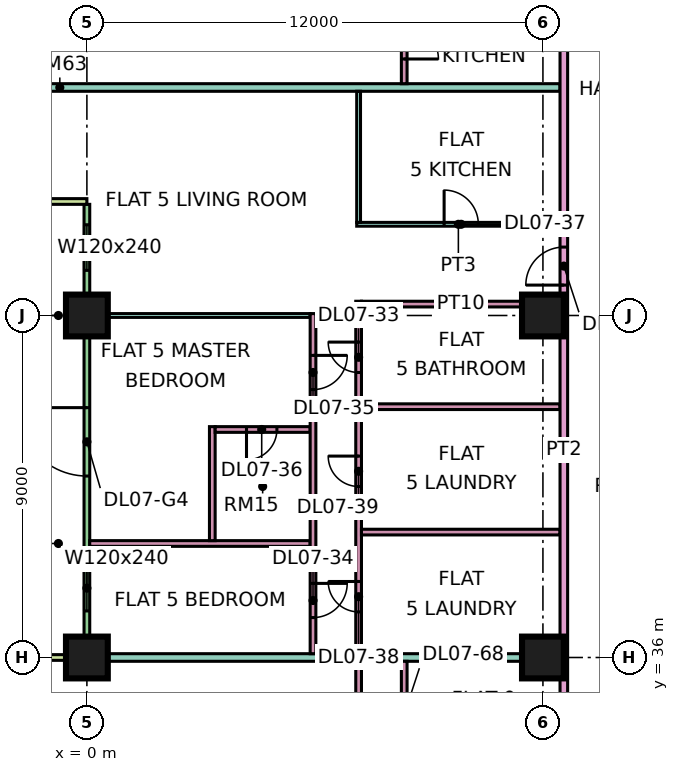
"""IFC4 building model, lengths in metres.
Left out: names, types, materials, properties, quantities, classifications, styles, units other than length and angle.
Written with IfcOpenShell. Run it as: python <this file> out.ifc"""

import sys

from ifc_helpers import new_model, si_unit, direction, frame, frame_2d, origin, origin_2d, place, context, subcontext, project, spatial, rectangle, extrude, element, fill, save


model = new_model("IFC4")
c1 = context("Model", 3, precision=1e-05, world=origin(), true_north=direction((0.0, 1.0)))
c2 = subcontext(c1, "Body", "Model", "MODEL_VIEW")
j1 = project(units=[si_unit("LENGTHUNIT", "METRE"), si_unit("PLANEANGLEUNIT", "RADIAN")], contexts=[c1])
p1 = place(None, origin())
s1 = spatial("IfcSite", under=j1, at=p1, CompositionType="ELEMENT")
p2 = place(p1, origin())
s2 = spatial("IfcBuilding", under=s1, at=p2, CompositionType="ELEMENT")
p3 = place(p2, frame((0.0, 0.0, 41.4)))
s3 = spatial("IfcBuildingStorey", under=s2, at=p3, CompositionType="ELEMENT", Elevation=41.4)
p4 = place(p3, frame((0.0, 36.0, 0.0), z_axis=(0.0, 0.0, 1.0), x_axis=(1.0, 0.0, 0.0)))
e1 = element("IfcColumn", 1, at=p4, inside=s3, PredefinedType="COLUMN", context=c2, shape_type="SweptSolid", body=[
    extrude(rectangle(XDim=1.1, YDim=1.1, at=origin_2d()), origin(), (0.0, 0.0, 1.0), 3.75),
])
for number, where, z_axis, x_axis in (
    (2, (0.0, 45.0, 0.0), (0.0, 0.0, 1.0), (1.0, 0.0, 0.0)),
    (3, (12.0, 36.0, 0.0), (0.0, 0.0, 1.0), (1.0, 0.0, 0.0)),
    (4, (12.0, 45.0, 0.0), (0.0, 0.0, 1.0), (1.0, 0.0, 0.0)),
):
    element("IfcColumn", number, at=place(p3, frame(where, z_axis=z_axis, x_axis=x_axis)), inside=s3, PredefinedType="COLUMN", context=c2, shape_type="SweptSolid", body=[
        extrude(rectangle(XDim=1.1, YDim=1.1, at=origin_2d()), origin(), (0.0, 0.0, 1.0), 3.75),
    ])
p5 = place(p3, frame((0.0, 47.925, 0.0), z_axis=(0.0, 0.0, 1.0), x_axis=(0.0, -1.0, 0.0)))
e5 = element("IfcWall", 5, at=p5, inside=s3, PredefinedType="SOLIDWALL", context=c2, shape_type="SweptSolid", body=[
    extrude(rectangle(XDim=11.85, YDim=0.15, at=frame_2d((5.925, 0.0))), origin(), (0.0, 0.0, 1.0), 3.35),
])
p6 = place(p5, frame((0.538, 0.0, 0.45)))
e6 = element("IfcOpeningElement", 6, at=p6, cuts=e5, PredefinedType="OPENING", context=c2, shape_type="SweptSolid", body=[
    extrude(rectangle(XDim=1.2, YDim=2.4, at=frame_2d((0.6, 1.2))), frame((0.0, 0.085, 0.0), z_axis=(0.0, -1.0, 0.0), x_axis=(1.0, 0.0, 0.0)), (0.0, 0.0, 1.0), 0.17),
])
p7 = place(p5, frame((5.35, 0.0, 0.0)))
e7 = element("IfcOpeningElement", 7, at=p7, cuts=e5, PredefinedType="OPENING", context=c2, shape_type="SweptSolid", body=[
    extrude(rectangle(XDim=1.8, YDim=2.4, at=frame_2d((0.9, 1.2))), frame((0.0, 0.085, 0.0), z_axis=(0.0, -1.0, 0.0), x_axis=(1.0, 0.0, 0.0)), (0.0, 0.0, 1.0), 0.17),
])
p8 = place(p5, frame((9.5, 0.0, 0.45)))
e8 = element("IfcOpeningElement", 8, at=p8, cuts=e5, PredefinedType="OPENING", context=c2, shape_type="SweptSolid", body=[
    extrude(rectangle(XDim=1.2, YDim=2.4, at=frame_2d((0.6, 1.2))), frame((0.0, 0.085, 0.0), z_axis=(0.0, -1.0, 0.0), x_axis=(1.0, 0.0, 0.0)), (0.0, 0.0, 1.0), 0.17),
])
for number, where, z_axis, x_axis in (
    (9, (-1.5, 48.0, 0.0), (0.0, 0.0, 1.0), (1.0, 0.0, 0.0)),
    (10, (-1.5, 36.0, 0.0), (0.0, 0.0, 1.0), (1.0, 0.0, 0.0)),
):
    element("IfcWall", number, at=place(p3, frame(where, z_axis=z_axis, x_axis=x_axis)), inside=s3, PredefinedType="SOLIDWALL", context=c2, shape_type="SweptSolid", body=[
        extrude(rectangle(XDim=1.5, YDim=0.15, at=frame_2d((0.75, 0.0))), origin(), (0.0, 0.0, 1.0), 3.35),
    ])
e11 = element("IfcWall", 11, at=p4, inside=s3, PredefinedType="PARTITIONING", context=c2, shape_type="SweptSolid", body=[
    extrude(rectangle(XDim=12.45, YDim=0.2, at=frame_2d((6.225, 0.0))), origin(), (0.0, 0.0, 1.0), 3.35),
])
p9 = place(p3, frame((-1.35, 51.0, 0.0), z_axis=(0.0, 0.0, 1.0), x_axis=(1.0, 0.0, 0.0)))
e12 = element("IfcWall", 12, at=p9, inside=s3, PredefinedType="PARTITIONING", context=c2, shape_type="SweptSolid", body=[
    extrude(rectangle(XDim=13.8, YDim=0.2, at=frame_2d((6.9, 0.0))), origin(), (0.0, 0.0, 1.0), 3.35),
])
p10 = place(p3, frame((0.074, 39.0, 0.0), z_axis=(0.0, 0.0, 1.0), x_axis=(1.0, 0.0, 0.0)))
e13 = element("IfcWall", 13, at=p10, inside=s3, PredefinedType="PARTITIONING", context=c2, shape_type="SweptSolid", body=[
    extrude(rectangle(XDim=5.801, YDim=0.15, at=frame_2d((2.9, 0.0))), origin(), (0.0, 0.0, 1.0), 3.35),
])
p11 = place(p3, frame((0.074, 45.0, 0.0), z_axis=(0.0, 0.0, 1.0), x_axis=(1.0, 0.0, 0.0)))
e14 = element("IfcWall", 14, at=p11, inside=s3, PredefinedType="PARTITIONING", context=c2, shape_type="SweptSolid", body=[
    extrude(rectangle(XDim=5.801, YDim=0.1, at=frame_2d((2.9, 0.0))), origin(), (0.0, 0.0, 1.0), 3.35),
])
p12 = place(p3, frame((3.3, 39.075, 0.0), z_axis=(0.0, 0.0, 1.0), x_axis=(0.0, 1.0, 0.0)))
e15 = element("IfcWall", 15, at=p12, inside=s3, PredefinedType="PARTITIONING", context=c2, shape_type="SweptSolid", body=[
    extrude(rectangle(XDim=3.0, YDim=0.15, at=frame_2d((1.5, 0.0))), origin(), (0.0, 0.0, 1.0), 3.35),
])
p13 = place(p3, frame((3.375, 42.0, 0.0), z_axis=(0.0, 0.0, 1.0), x_axis=(1.0, 0.0, 0.0)))
e16 = element("IfcWall", 16, at=p13, inside=s3, PredefinedType="PARTITIONING", context=c2, shape_type="SweptSolid", body=[
    extrude(rectangle(XDim=2.5, YDim=0.15, at=frame_2d((1.25, 0.0))), origin(), (0.0, 0.0, 1.0), 3.35),
])
p14 = place(p13, frame((0.825, 0.0, 0.0)))
e17 = element("IfcOpeningElement", 17, at=p14, cuts=e16, PredefinedType="OPENING", context=c2, shape_type="SweptSolid", body=[
    extrude(rectangle(XDim=0.8, YDim=2.1, at=frame_2d((0.4, 1.05))), frame((0.0, 0.085, 0.0), z_axis=(0.0, -1.0, 0.0), x_axis=(1.0, 0.0, 0.0)), (0.0, 0.0, 1.0), 0.17),
])
p15 = place(p3, frame((5.95, 36.1, 0.0), z_axis=(0.0, 0.0, 1.0), x_axis=(0.0, 1.0, 0.0)))
e18 = element("IfcWall", 18, at=p15, inside=s3, PredefinedType="PARTITIONING", context=c2, shape_type="SweptSolid", body=[
    extrude(rectangle(XDim=8.95, YDim=0.15, at=frame_2d((4.475, 0.0))), origin(), (0.0, 0.0, 1.0), 3.35),
])
p16 = place(p15, frame((0.95, 0.0, 0.0)))
e19 = element("IfcOpeningElement", 19, at=p16, cuts=e18, PredefinedType="OPENING", context=c2, shape_type="SweptSolid", body=[
    extrude(rectangle(XDim=0.9, YDim=2.1, at=frame_2d((0.45, 1.05))), frame((0.0, 0.085, 0.0), z_axis=(0.0, -1.0, 0.0), x_axis=(1.0, 0.0, 0.0)), (0.0, 0.0, 1.0), 0.17),
])
p17 = place(p15, frame((6.95, 0.0, 0.0)))
e20 = element("IfcOpeningElement", 20, at=p17, cuts=e18, PredefinedType="OPENING", context=c2, shape_type="SweptSolid", body=[
    extrude(rectangle(XDim=0.9, YDim=2.1, at=frame_2d((0.45, 1.05))), frame((0.0, 0.085, 0.0), z_axis=(0.0, -1.0, 0.0), x_axis=(1.0, 0.0, 0.0)), (0.0, 0.0, 1.0), 0.17),
])
p18 = place(p3, frame((7.1, 47.4, 0.0), z_axis=(0.0, 0.0, 1.0), x_axis=(1.0, 0.0, 0.0)))
e21 = element("IfcWall", 21, at=p18, inside=s3, PredefinedType="PARTITIONING", context=c2, shape_type="SweptSolid", body=[
    extrude(rectangle(XDim=5.35, YDim=0.1, at=frame_2d((2.675, 0.0))), origin(), (0.0, 0.0, 1.0), 3.35),
])
p19 = place(p18, frame((2.3, 0.0, 0.0)))
e22 = element("IfcOpeningElement", 22, at=p19, cuts=e21, PredefinedType="OPENING", context=c2, shape_type="SweptSolid", body=[
    extrude(rectangle(XDim=0.9, YDim=2.1, at=frame_2d((0.45, 1.05))), frame((0.0, 0.06, 0.0), z_axis=(0.0, -1.0, 0.0), x_axis=(1.0, 0.0, 0.0)), (0.0, 0.0, 1.0), 0.12),
])
p20 = place(p3, frame((7.15, 29.95, 0.0), z_axis=(0.0, 0.0, 1.0), x_axis=(0.0, 1.0, 0.0)))
e23 = element("IfcWall", 23, at=p20, inside=s3, PredefinedType="PARTITIONING", context=c2, shape_type="SweptSolid", body=[
    extrude(rectangle(XDim=5.95, YDim=0.15, at=frame_2d((2.975, 0.0))), origin(), (0.0, 0.0, 1.0), 3.35),
])
p21 = place(p20, frame((1.1, 0.0, 0.0)))
e24 = element("IfcOpeningElement", 24, at=p21, cuts=e23, PredefinedType="OPENING", context=c2, shape_type="SweptSolid", body=[
    extrude(rectangle(XDim=0.9, YDim=2.1, at=frame_2d((0.45, 1.05))), frame((0.0, 0.085, 0.0), z_axis=(0.0, -1.0, 0.0), x_axis=(1.0, 0.0, 0.0)), (0.0, 0.0, 1.0), 0.17),
])
p22 = place(p20, frame((4.1, 0.0, 0.0)))
e25 = element("IfcOpeningElement", 25, at=p22, cuts=e23, PredefinedType="OPENING", context=c2, shape_type="SweptSolid", body=[
    extrude(rectangle(XDim=0.9, YDim=2.1, at=frame_2d((0.45, 1.05))), frame((0.0, 0.085, 0.0), z_axis=(0.0, -1.0, 0.0), x_axis=(1.0, 0.0, 0.0)), (0.0, 0.0, 1.0), 0.17),
])
p23 = place(p3, frame((7.15, 36.1, 0.0), z_axis=(0.0, 0.0, 1.0), x_axis=(0.0, 1.0, 0.0)))
e26 = element("IfcWall", 26, at=p23, inside=s3, PredefinedType="PARTITIONING", context=c2, shape_type="SweptSolid", body=[
    extrude(rectangle(XDim=9.275, YDim=0.15, at=frame_2d((4.637, 0.0))), origin(), (0.0, 0.0, 1.0), 3.35),
])
p24 = place(p23, frame((7.4, 0.0, 0.0)))
e27 = element("IfcOpeningElement", 27, at=p24, cuts=e26, PredefinedType="OPENING", context=c2, shape_type="SweptSolid", body=[
    extrude(rectangle(XDim=0.8, YDim=2.1, at=frame_2d((0.4, 1.05))), frame((0.0, 0.085, 0.0), z_axis=(0.0, -1.0, 0.0), x_axis=(1.0, 0.0, 0.0)), (0.0, 0.0, 1.0), 0.17),
])
p25 = place(p23, frame((1.1, 0.0, 0.0)))
e28 = element("IfcOpeningElement", 28, at=p25, cuts=e26, PredefinedType="OPENING", context=c2, shape_type="SweptSolid", body=[
    extrude(rectangle(XDim=0.8, YDim=2.1, at=frame_2d((0.4, 1.05))), frame((0.0, 0.085, 0.0), z_axis=(0.0, -1.0, 0.0), x_axis=(1.0, 0.0, 0.0)), (0.0, 0.0, 1.0), 0.17),
])
p26 = place(p23, frame((4.4, 0.0, 0.0)))
e29 = element("IfcOpeningElement", 29, at=p26, cuts=e26, PredefinedType="OPENING", context=c2, shape_type="SweptSolid", body=[
    extrude(rectangle(XDim=0.8, YDim=2.1, at=frame_2d((0.4, 1.05))), frame((0.0, 0.085, 0.0), z_axis=(0.0, -1.0, 0.0), x_axis=(1.0, 0.0, 0.0)), (0.0, 0.0, 1.0), 0.17),
])
p27 = place(p3, frame((7.15, 47.45, 0.0), z_axis=(0.0, 0.0, 1.0), x_axis=(0.0, 1.0, 0.0)))
e30 = element("IfcWall", 30, at=p27, inside=s3, PredefinedType="PARTITIONING", context=c2, shape_type="SweptSolid", body=[
    extrude(rectangle(XDim=3.45, YDim=0.1, at=frame_2d((1.725, 0.0))), origin(), (0.0, 0.0, 1.0), 3.35),
])
for number, where, z_axis, x_axis in (
    (31, (7.225, 39.3, 0.0), (0.0, 0.0, 1.0), (1.0, 0.0, 0.0)),
    (32, (7.225, 42.6, 0.0), (0.0, 0.0, 1.0), (1.0, 0.0, 0.0)),
    (33, (7.225, 45.3, 0.0), (0.0, 0.0, 1.0), (1.0, 0.0, 0.0)),
):
    element("IfcWall", number, at=place(p3, frame(where, z_axis=z_axis, x_axis=x_axis)), inside=s3, PredefinedType="PARTITIONING", context=c2, shape_type="SweptSolid", body=[
        extrude(rectangle(XDim=5.225, YDim=0.15, at=frame_2d((2.612, 0.0))), origin(), (0.0, 0.0, 1.0), 3.35),
    ])
p28 = place(p3, frame((8.35, 26.325, 0.0), z_axis=(0.0, 0.0, 1.0), x_axis=(0.0, 1.0, 0.0)))
e34 = element("IfcWall", 34, at=p28, inside=s3, PredefinedType="PARTITIONING", context=c2, shape_type="SweptSolid", body=[
    extrude(rectangle(XDim=9.575, YDim=0.15, at=frame_2d((4.788, 0.0))), origin(), (0.0, 0.0, 1.0), 3.35),
])
p29 = place(p28, frame((4.425, 0.0, 0.0)))
e35 = element("IfcOpeningElement", 35, at=p29, cuts=e34, PredefinedType="OPENING", context=c2, shape_type="SweptSolid", body=[
    extrude(rectangle(XDim=0.8, YDim=2.1, at=frame_2d((0.4, 1.05))), frame((0.0, 0.085, 0.0), z_axis=(0.0, -1.0, 0.0), x_axis=(1.0, 0.0, 0.0)), (0.0, 0.0, 1.0), 0.17),
])
p30 = place(p28, frame((7.725, 0.0, 0.0)))
e36 = element("IfcOpeningElement", 36, at=p30, cuts=e34, PredefinedType="OPENING", context=c2, shape_type="SweptSolid", body=[
    extrude(rectangle(XDim=0.9, YDim=2.1, at=frame_2d((0.45, 1.05))), frame((0.0, 0.085, 0.0), z_axis=(0.0, -1.0, 0.0), x_axis=(1.0, 0.0, 0.0)), (0.0, 0.0, 1.0), 0.17),
])
p31 = place(p28, frame((1.125, 0.0, 0.0)))
e37 = element("IfcOpeningElement", 37, at=p31, cuts=e34, PredefinedType="OPENING", context=c2, shape_type="SweptSolid", body=[
    extrude(rectangle(XDim=0.8, YDim=2.1, at=frame_2d((0.4, 1.05))), frame((0.0, 0.085, 0.0), z_axis=(0.0, -1.0, 0.0), x_axis=(1.0, 0.0, 0.0)), (0.0, 0.0, 1.0), 0.17),
])
p32 = place(p3, frame((8.35, 51.1, 0.0), z_axis=(0.0, 0.0, 1.0), x_axis=(0.0, 1.0, 0.0)))
e38 = element("IfcWall", 38, at=p32, inside=s3, PredefinedType="PARTITIONING", context=c2, shape_type="SweptSolid", body=[
    extrude(rectangle(XDim=5.675, YDim=0.15, at=frame_2d((2.837, 0.0))), origin(), (0.0, 0.0, 1.0), 3.35),
])
p33 = place(p32, frame((0.65, 0.0, 0.0)))
e39 = element("IfcOpeningElement", 39, at=p33, cuts=e38, PredefinedType="OPENING", context=c2, shape_type="SweptSolid", body=[
    extrude(rectangle(XDim=0.9, YDim=2.1, at=frame_2d((0.45, 1.05))), frame((0.0, 0.085, 0.0), z_axis=(0.0, -1.0, 0.0), x_axis=(1.0, 0.0, 0.0)), (0.0, 0.0, 1.0), 0.17),
])
p34 = place(p3, frame((12.55, 20.0, 0.0), z_axis=(0.0, 0.0, 1.0), x_axis=(0.0, 1.0, 0.0)))
e40 = element("IfcWall", 40, at=p34, inside=s3, PredefinedType="PARTITIONING", context=c2, shape_type="SweptSolid", body=[
    extrude(rectangle(XDim=42.926, YDim=0.2, at=frame_2d((21.463, 0.0))), origin(), (0.0, 0.0, 1.0), 3.35),
])
p35 = place(p34, frame((25.8, 0.0, 0.0)))
e41 = element("IfcOpeningElement", 41, at=p35, cuts=e40, PredefinedType="OPENING", context=c2, shape_type="SweptSolid", body=[
    extrude(rectangle(XDim=1.0, YDim=2.1, at=frame_2d((0.5, 1.05))), frame((0.0, 0.11, 0.0), z_axis=(0.0, -1.0, 0.0), x_axis=(1.0, 0.0, 0.0)), (0.0, 0.0, 1.0), 0.22),
])
p36 = place(p34, frame((37.65, 0.0, 0.0)))
e42 = element("IfcOpeningElement", 42, at=p36, cuts=e40, PredefinedType="OPENING", context=c2, shape_type="SweptSolid", body=[
    extrude(rectangle(XDim=1.0, YDim=2.1, at=frame_2d((0.5, 1.05))), frame((0.0, 0.11, 0.0), z_axis=(0.0, -1.0, 0.0), x_axis=(1.0, 0.0, 0.0)), (0.0, 0.0, 1.0), 0.22),
])
p37 = place(p34, frame((0.6, 0.0, 0.0)))
e43 = element("IfcOpeningElement", 43, at=p37, cuts=e40, PredefinedType="OPENING", context=c2, shape_type="SweptSolid", body=[
    extrude(rectangle(XDim=1.2, YDim=2.1, at=frame_2d((0.6, 1.05))), frame((0.0, 0.11, 0.0), z_axis=(0.0, -1.0, 0.0), x_axis=(1.0, 0.0, 0.0)), (0.0, 0.0, 1.0), 0.22),
])
p38 = place(p34, frame((4.65, 0.0, 0.0)))
e44 = element("IfcOpeningElement", 44, at=p38, cuts=e40, PredefinedType="OPENING", context=c2, shape_type="SweptSolid", body=[
    extrude(rectangle(XDim=1.0, YDim=2.1, at=frame_2d((0.5, 1.05))), frame((0.0, 0.11, 0.0), z_axis=(0.0, -1.0, 0.0), x_axis=(1.0, 0.0, 0.0)), (0.0, 0.0, 1.0), 0.22),
])
p39 = place(p6, origin())
e45 = element("IfcWindow", 45, at=p39, inside=s3, PartitioningType="SINGLE_PANEL", PredefinedType="WINDOW", context=c2, shape_type="SweptSolid", body=[
    extrude(rectangle(XDim=1.2, YDim=2.4, at=frame_2d((0.6, 1.2))), frame((0.0, 0.03, 0.0), z_axis=(0.0, -1.0, 0.0), x_axis=(1.0, 0.0, 0.0)), (0.0, 0.0, 1.0), 0.06),
])
fill(e6, e45)
p40 = place(p7, frame((1.8, 0.0, 0.0), z_axis=(0.0, 0.0, 1.0), x_axis=(-1.0, 0.0, 0.0)))
e46 = element("IfcDoor", 46, at=p40, inside=s3, OperationType="DOUBLE_DOOR_SINGLE_SWING", PredefinedType="DOOR", context=c2, shape_type="SweptSolid", body=[
    extrude(rectangle(XDim=1.8, YDim=2.4, at=frame_2d((0.9, 1.2))), frame((0.0, 0.025, 0.0), z_axis=(0.0, -1.0, 0.0), x_axis=(1.0, 0.0, 0.0)), (0.0, 0.0, 1.0), 0.05),
])
fill(e7, e46)
p41 = place(p8, origin())
e47 = element("IfcWindow", 47, at=p41, inside=s3, PartitioningType="SINGLE_PANEL", PredefinedType="WINDOW", context=c2, shape_type="SweptSolid", body=[
    extrude(rectangle(XDim=1.2, YDim=2.4, at=frame_2d((0.6, 1.2))), frame((0.0, 0.03, 0.0), z_axis=(0.0, -1.0, 0.0), x_axis=(1.0, 0.0, 0.0)), (0.0, 0.0, 1.0), 0.06),
])
fill(e8, e47)
p42 = place(p24, frame((0.8, 0.0, 0.0), z_axis=(0.0, 0.0, 1.0), x_axis=(-1.0, 0.0, 0.0)))
e48 = element("IfcDoor", 48, at=p42, inside=s3, OperationType="SINGLE_SWING_RIGHT", PredefinedType="DOOR", context=c2, shape_type="SweptSolid", body=[
    extrude(rectangle(XDim=0.8, YDim=2.1, at=frame_2d((0.4, 1.05))), frame((0.0, 0.025, 0.0), z_axis=(0.0, -1.0, 0.0), x_axis=(1.0, 0.0, 0.0)), (0.0, 0.0, 1.0), 0.05),
])
fill(e27, e48)
p43 = place(p16, origin())
e49 = element("IfcDoor", 49, at=p43, inside=s3, OperationType="SINGLE_SWING_RIGHT", PredefinedType="DOOR", context=c2, shape_type="SweptSolid", body=[
    extrude(rectangle(XDim=0.9, YDim=2.1, at=frame_2d((0.45, 1.05))), frame((0.0, 0.025, 0.0), z_axis=(0.0, -1.0, 0.0), x_axis=(1.0, 0.0, 0.0)), (0.0, 0.0, 1.0), 0.05),
])
fill(e19, e49)
p44 = place(p17, origin())
e50 = element("IfcDoor", 50, at=p44, inside=s3, OperationType="SINGLE_SWING_RIGHT", PredefinedType="DOOR", context=c2, shape_type="SweptSolid", body=[
    extrude(rectangle(XDim=0.9, YDim=2.1, at=frame_2d((0.45, 1.05))), frame((0.0, 0.025, 0.0), z_axis=(0.0, -1.0, 0.0), x_axis=(1.0, 0.0, 0.0)), (0.0, 0.0, 1.0), 0.05),
])
fill(e20, e50)
p45 = place(p14, frame((0.8, 0.0, 0.0), z_axis=(0.0, 0.0, 1.0), x_axis=(-1.0, 0.0, 0.0)))
e51 = element("IfcDoor", 51, at=p45, inside=s3, OperationType="SINGLE_SWING_LEFT", PredefinedType="DOOR", context=c2, shape_type="SweptSolid", body=[
    extrude(rectangle(XDim=0.8, YDim=2.1, at=frame_2d((0.4, 1.05))), frame((0.0, 0.025, 0.0), z_axis=(0.0, -1.0, 0.0), x_axis=(1.0, 0.0, 0.0)), (0.0, 0.0, 1.0), 0.05),
])
fill(e17, e51)
p46 = place(p19, origin())
e52 = element("IfcDoor", 52, at=p46, inside=s3, OperationType="SINGLE_SWING_LEFT", PredefinedType="DOOR", context=c2, shape_type="SweptSolid", body=[
    extrude(rectangle(XDim=0.9, YDim=2.1, at=frame_2d((0.45, 1.05))), frame((0.0, 0.025, 0.0), z_axis=(0.0, -1.0, 0.0), x_axis=(1.0, 0.0, 0.0)), (0.0, 0.0, 1.0), 0.05),
])
fill(e22, e52)
p47 = place(p25, frame((0.8, 0.0, 0.0), z_axis=(0.0, 0.0, 1.0), x_axis=(-1.0, 0.0, 0.0)))
e53 = element("IfcDoor", 53, at=p47, inside=s3, OperationType="SINGLE_SWING_RIGHT", PredefinedType="DOOR", context=c2, shape_type="SweptSolid", body=[
    extrude(rectangle(XDim=0.8, YDim=2.1, at=frame_2d((0.4, 1.05))), frame((0.0, 0.025, 0.0), z_axis=(0.0, -1.0, 0.0), x_axis=(1.0, 0.0, 0.0)), (0.0, 0.0, 1.0), 0.05),
])
fill(e28, e53)
p48 = place(p26, frame((0.8, 0.0, 0.0), z_axis=(0.0, 0.0, 1.0), x_axis=(-1.0, 0.0, 0.0)))
e54 = element("IfcDoor", 54, at=p48, inside=s3, OperationType="SINGLE_SWING_RIGHT", PredefinedType="DOOR", context=c2, shape_type="SweptSolid", body=[
    extrude(rectangle(XDim=0.8, YDim=2.1, at=frame_2d((0.4, 1.05))), frame((0.0, 0.025, 0.0), z_axis=(0.0, -1.0, 0.0), x_axis=(1.0, 0.0, 0.0)), (0.0, 0.0, 1.0), 0.05),
])
fill(e29, e54)
p49 = place(p35, origin())
e55 = element("IfcDoor", 55, at=p49, inside=s3, OperationType="SINGLE_SWING_LEFT", PredefinedType="DOOR", context=c2, shape_type="SweptSolid", body=[
    extrude(rectangle(XDim=1.0, YDim=2.1, at=frame_2d((0.5, 1.05))), frame((0.0, 0.025, 0.0), z_axis=(0.0, -1.0, 0.0), x_axis=(1.0, 0.0, 0.0)), (0.0, 0.0, 1.0), 0.05),
])
fill(e41, e55)
p50 = place(p33, frame((0.9, 0.0, 0.0), z_axis=(0.0, 0.0, 1.0), x_axis=(-1.0, 0.0, 0.0)))
e56 = element("IfcDoor", 56, at=p50, inside=s3, OperationType="SINGLE_SWING_LEFT", PredefinedType="DOOR", context=c2, shape_type="SweptSolid", body=[
    extrude(rectangle(XDim=0.9, YDim=2.1, at=frame_2d((0.45, 1.05))), frame((0.0, 0.025, 0.0), z_axis=(0.0, -1.0, 0.0), x_axis=(1.0, 0.0, 0.0)), (0.0, 0.0, 1.0), 0.05),
])
fill(e39, e56)
save(model, sys.argv[1])
